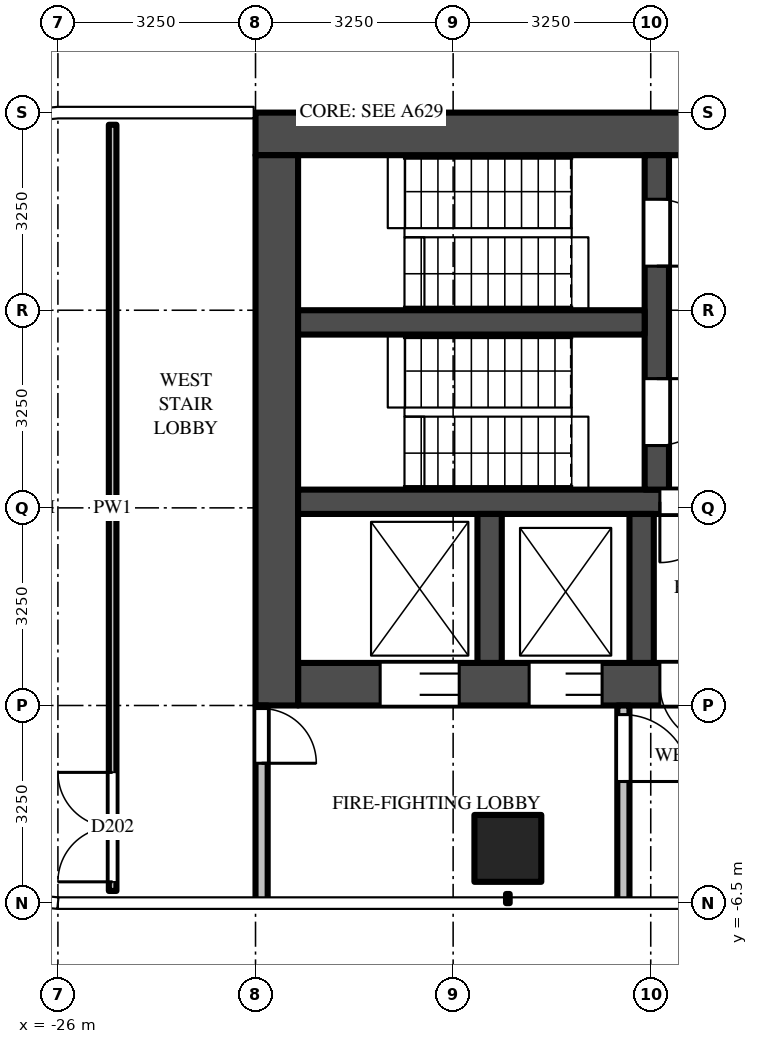
"""IFC4 building model, lengths in metres.
Left out: names, types, materials, properties, quantities, classifications, styles, units other than length and angle.
Written with IfcOpenShell. Run it as: python <this file> out.ifc"""

import sys

from ifc_helpers import new_model, si_unit, direction, frame, frame_2d, origin, origin_2d, place, context, subcontext, project, spatial, rectangle, extrude, source, transform, mapped, element, fill, save


model = new_model("IFC4")
c1 = context("Model", 3, precision=1e-05, world=origin(), true_north=direction((0.0, 1.0)))
c2 = subcontext(c1, "Body", "Model", "MODEL_VIEW")
j1 = project(units=[si_unit("LENGTHUNIT", "METRE"), si_unit("PLANEANGLEUNIT", "RADIAN")], contexts=[c1])
p1 = place(None, origin())
s1 = spatial("IfcSite", under=j1, at=p1, CompositionType="ELEMENT")
p2 = place(p1, origin())
s2 = spatial("IfcBuilding", under=s1, at=p2, CompositionType="ELEMENT")
p3 = place(p2, frame((0.0, 0.0, 236.3)))
s3 = spatial("IfcBuildingStorey", under=s2, at=p3, CompositionType="ELEMENT", Elevation=236.3)
m1 = source(origin(), c2, "Body", "SweptSolid", [
    extrude(rectangle(XDim=1.1, YDim=1.1, at=origin_2d()), origin(), (0.0, 0.0, 1.0), 3.9),
])
p4 = place(p3, frame((-18.6, -5.6, 0.0), z_axis=(0.0, 0.0, 1.0), x_axis=(1.0, 0.0, 0.0)))
e1 = element("IfcColumn", 1, at=p4, inside=s3, PredefinedType="COLUMN", context=c2, shape_type="MappedRepresentation", body=[
    mapped(m1, transform((0.0, 0.0, 0.0))),
])
m2 = source(origin(), c2, "Body", "SweptSolid", [
    extrude(rectangle(XDim=16.6, YDim=0.7, at=frame_2d((8.3, 0.0))), origin(), (0.0, 0.0, 1.0), 3.7),
])
p5 = place(p3, frame((-6.15, 6.15, 0.0), z_axis=(0.0, 0.0, 1.0), x_axis=(-1.0, 0.0, 0.0)))
e2 = element("IfcWall", 2, at=p5, inside=s3, PredefinedType="SHEAR", context=c2, shape_type="MappedRepresentation", body=[
    mapped(m2, transform((0.0, 0.0, 0.0))),
])
m3 = source(origin(), c2, "Body", "SweptSolid", [
    extrude(rectangle(XDim=14.85, YDim=0.7, at=frame_2d((7.425, 0.0))), origin(), (0.0, 0.0, 1.0), 3.7),
])
p6 = place(p3, frame((-7.2, -2.9, 0.0), z_axis=(0.0, 0.0, 1.0), x_axis=(-1.0, 0.0, 0.0)))
e3 = element("IfcWall", 3, at=p6, inside=s3, PredefinedType="SHEAR", context=c2, shape_type="MappedRepresentation", body=[
    mapped(m3, transform((0.0, 0.0, 0.0))),
])
m4 = source(origin(), c2, "Body", "SweptSolid", [
    extrude(rectangle(XDim=1.1, YDim=2.1, at=frame_2d((0.55, 1.05))), frame((0.0, 0.36, 0.0), z_axis=(0.0, -1.0, 0.0), x_axis=(1.0, 0.0, 0.0)), (0.0, 0.0, 1.0), 0.72),
])
p7 = place(p6, frame((0.55, 0.0, 0.0)))
e4 = element("IfcOpeningElement", 4, at=p7, cuts=e3, PredefinedType="OPENING", context=c2, shape_type="MappedRepresentation", body=[
    mapped(m4, transform((0.0, 0.0, 0.0))),
])
p8 = place(p6, frame((3.15, 0.0, 0.0)))
e5 = element("IfcOpeningElement", 5, at=p8, cuts=e3, PredefinedType="OPENING", context=c2, shape_type="MappedRepresentation", body=[
    mapped(m4, transform((0.0, 0.0, 0.0))),
])
m5 = source(origin(), c2, "Body", "SweptSolid", [
    extrude(rectangle(XDim=1.2, YDim=2.1, at=frame_2d((0.6, 1.05))), frame((0.0, 0.36, 0.0), z_axis=(0.0, -1.0, 0.0), x_axis=(1.0, 0.0, 0.0)), (0.0, 0.0, 1.0), 0.72),
])
p9 = place(p6, frame((5.7, 0.0, 0.0)))
e6 = element("IfcOpeningElement", 6, at=p9, cuts=e3, PredefinedType="OPENING", context=c2, shape_type="MappedRepresentation", body=[
    mapped(m5, transform((0.0, 0.0, 0.0))),
])
m6 = source(origin(), c2, "Body", "SweptSolid", [
    extrude(rectangle(XDim=1.3, YDim=2.1, at=frame_2d((0.65, 1.05))), frame((0.0, 0.36, 0.0), z_axis=(0.0, -1.0, 0.0), x_axis=(1.0, 0.0, 0.0)), (0.0, 0.0, 1.0), 0.72),
])
p10 = place(p6, frame((12.2, 0.0, 0.0)))
e7 = element("IfcOpeningElement", 7, at=p10, cuts=e3, PredefinedType="OPENING", context=c2, shape_type="MappedRepresentation", body=[
    mapped(m6, transform((0.0, 0.0, 0.0))),
])
p11 = place(p6, frame((9.85, 0.0, 0.0)))
e8 = element("IfcOpeningElement", 8, at=p11, cuts=e3, PredefinedType="OPENING", context=c2, shape_type="MappedRepresentation", body=[
    mapped(m5, transform((0.0, 0.0, 0.0))),
])
m7 = source(origin(), c2, "Body", "SweptSolid", [
    extrude(rectangle(XDim=1.0, YDim=2.1, at=frame_2d((0.5, 1.05))), frame((0.0, 0.36, 0.0), z_axis=(0.0, -1.0, 0.0), x_axis=(1.0, 0.0, 0.0)), (0.0, 0.0, 1.0), 0.72),
])
p12 = place(p6, frame((7.9, 0.0, 0.0)))
e9 = element("IfcOpeningElement", 9, at=p12, cuts=e3, PredefinedType="OPENING", context=c2, shape_type="MappedRepresentation", body=[
    mapped(m7, transform((0.0, 0.0, 0.0))),
])
m8 = source(origin(), c2, "Body", "SweptSolid", [
    extrude(rectangle(XDim=9.05, YDim=0.7, at=frame_2d((4.525, 0.0))), origin(), (0.0, 0.0, 1.0), 3.7),
])
p13 = place(p3, frame((-22.4, 5.8, 0.0), z_axis=(0.0, 0.0, 1.0), x_axis=(0.0, -1.0, 0.0)))
e10 = element("IfcWall", 10, at=p13, inside=s3, PredefinedType="SHEAR", context=c2, shape_type="MappedRepresentation", body=[
    mapped(m8, transform((0.0, 0.0, 0.0))),
])
m9 = source(origin(), c2, "Body", "SweptSolid", [
    extrude(rectangle(XDim=14.85, YDim=0.4, at=frame_2d((7.425, 0.0))), origin(), (0.0, 0.0, 1.0), 3.7),
])
p14 = place(p3, frame((-7.2, 0.1, 0.0), z_axis=(0.0, 0.0, 1.0), x_axis=(-1.0, 0.0, 0.0)))
e11 = element("IfcWall", 11, at=p14, inside=s3, PredefinedType="SHEAR", context=c2, shape_type="MappedRepresentation", body=[
    mapped(m9, transform((0.0, 0.0, 0.0))),
])
m10 = source(origin(), c2, "Body", "SweptSolid", [
    extrude(rectangle(XDim=1.0, YDim=2.1, at=frame_2d((0.5, 1.05))), frame((0.0, 0.21, 0.0), z_axis=(0.0, -1.0, 0.0), x_axis=(1.0, 0.0, 0.0)), (0.0, 0.0, 1.0), 0.42),
])
p15 = place(p14, frame((7.9, 0.0, 0.0)))
e12 = element("IfcOpeningElement", 12, at=p15, cuts=e11, PredefinedType="OPENING", context=c2, shape_type="MappedRepresentation", body=[
    mapped(m10, transform((0.0, 0.0, 0.0))),
])
m11 = source(origin(), c2, "Body", "SweptSolid", [
    extrude(rectangle(XDim=5.5, YDim=0.4, at=frame_2d((2.75, 0.0))), origin(), (0.0, 0.0, 1.0), 3.7),
])
p16 = place(p3, frame((-16.15, 5.8, 0.0), z_axis=(0.0, 0.0, 1.0), x_axis=(0.0, -1.0, 0.0)))
e13 = element("IfcWall", 13, at=p16, inside=s3, PredefinedType="SHEAR", context=c2, shape_type="MappedRepresentation", body=[
    mapped(m11, transform((0.0, 0.0, 0.0))),
])
m12 = source(origin(), c2, "Body", "SweptSolid", [
    extrude(rectangle(XDim=1.1, YDim=2.1, at=frame_2d((0.55, 1.05))), frame((0.0, 0.21, 0.0), z_axis=(0.0, -1.0, 0.0), x_axis=(1.0, 0.0, 0.0)), (0.0, 0.0, 1.0), 0.42),
])
p17 = place(p16, frame((0.725, 0.0, 0.0)))
e14 = element("IfcOpeningElement", 14, at=p17, cuts=e13, PredefinedType="OPENING", context=c2, shape_type="MappedRepresentation", body=[
    mapped(m12, transform((0.0, 0.0, 0.0))),
])
p18 = place(p16, frame((3.675, 0.0, 0.0)))
e15 = element("IfcOpeningElement", 15, at=p18, cuts=e13, PredefinedType="OPENING", context=c2, shape_type="MappedRepresentation", body=[
    mapped(m12, transform((0.0, 0.0, 0.0))),
])
m13 = source(origin(), c2, "Body", "SweptSolid", [
    extrude(rectangle(XDim=5.7, YDim=0.4, at=frame_2d((2.85, 0.0))), origin(), (0.0, 0.0, 1.0), 3.7),
])
p19 = place(p3, frame((-16.35, 3.05, 0.0), z_axis=(0.0, 0.0, 1.0), x_axis=(-1.0, 0.0, 0.0)))
e16 = element("IfcWall", 16, at=p19, inside=s3, PredefinedType="SHEAR", context=c2, shape_type="MappedRepresentation", body=[
    mapped(m13, transform((0.0, 0.0, 0.0))),
])
m14 = source(origin(), c2, "Body", "SweptSolid", [
    extrude(rectangle(XDim=2.45, YDim=0.4, at=frame_2d((1.225, 0.0))), origin(), (0.0, 0.0, 1.0), 3.7),
])
for number, where, z_axis, x_axis in (
    (17, (-16.4, -0.1, 0.0), (0.0, 0.0, 1.0), (0.0, -1.0, 0.0)),
    (18, (-18.9, -0.1, 0.0), (0.0, 0.0, 1.0), (0.0, -1.0, 0.0)),
):
    element("IfcWall", number, at=place(p3, frame(where, z_axis=z_axis, x_axis=x_axis)), inside=s3, PredefinedType="SHEAR", context=c2, shape_type="MappedRepresentation", body=[
        mapped(m14, transform((0.0, 0.0, 0.0))),
    ])
m15 = source(origin(), c2, "Body", "SweptSolid", [
    extrude(rectangle(XDim=3.25, YDim=0.2, at=frame_2d((1.625, 0.0))), origin(), (0.0, 0.0, 1.0), 3.7),
])
p20 = place(p3, frame((-16.7, -3.25, 0.0), z_axis=(0.0, 0.0, 1.0), x_axis=(0.0, -1.0, 0.0)))
e19 = element("IfcWall", 19, at=p20, inside=s3, PredefinedType="PARTITIONING", context=c2, shape_type="MappedRepresentation", body=[
    mapped(m15, transform((0.0, 0.0, 0.0))),
])
m16 = source(origin(), c2, "Body", "SweptSolid", [
    extrude(rectangle(XDim=1.1, YDim=2.1, at=frame_2d((0.55, 1.05))), frame((0.0, 0.11, 0.0), z_axis=(0.0, -1.0, 0.0), x_axis=(1.0, 0.0, 0.0)), (0.0, 0.0, 1.0), 0.22),
])
p21 = place(p20, frame((0.15, 0.0, 0.0)))
e20 = element("IfcOpeningElement", 20, at=p21, cuts=e19, PredefinedType="OPENING", context=c2, shape_type="MappedRepresentation", body=[
    mapped(m16, transform((0.0, 0.0, 0.0))),
])
p22 = place(p3, frame((-22.65, -3.25, 0.0), z_axis=(0.0, 0.0, 1.0), x_axis=(0.0, -1.0, 0.0)))
e21 = element("IfcWall", 21, at=p22, inside=s3, PredefinedType="PARTITIONING", context=c2, shape_type="MappedRepresentation", body=[
    mapped(m15, transform((0.0, 0.0, 0.0))),
])
m17 = source(origin(), c2, "Body", "SweptSolid", [
    extrude(rectangle(XDim=0.9, YDim=2.1, at=frame_2d((0.45, 1.05))), frame((0.0, 0.11, 0.0), z_axis=(0.0, -1.0, 0.0), x_axis=(1.0, 0.0, 0.0)), (0.0, 0.0, 1.0), 0.22),
])
p23 = place(p22, frame((0.05, 0.0, 0.0)))
e22 = element("IfcOpeningElement", 22, at=p23, cuts=e21, PredefinedType="OPENING", context=c2, shape_type="MappedRepresentation", body=[
    mapped(m17, transform((0.0, 0.0, 0.0))),
])
m18 = source(origin(), c2, "Body", "SweptSolid", [
    extrude(rectangle(XDim=12.6, YDim=0.125, at=frame_2d((6.3, 0.0))), origin(), (0.0, 0.0, 1.0), 2.78),
])
p24 = place(p3, frame((-25.1, -6.3, 0.0), z_axis=(0.0, 0.0, 1.0), x_axis=(0.0, 1.0, 0.0)))
e23 = element("IfcWall", 23, at=p24, inside=s3, PredefinedType="PARTITIONING", context=c2, shape_type="MappedRepresentation", body=[
    mapped(m18, transform((0.0, 0.0, 0.0))),
])
m19 = source(origin(), c2, "Body", "SweptSolid", [
    extrude(rectangle(XDim=1.8, YDim=2.1, at=frame_2d((0.9, 1.05))), frame((0.0, 0.073, 0.0), z_axis=(0.0, -1.0, 0.0), x_axis=(1.0, 0.0, 0.0)), (0.0, 0.0, 1.0), 0.145),
])
p25 = place(p24, frame((0.15, 0.0, 0.0)))
e24 = element("IfcOpeningElement", 24, at=p25, cuts=e23, PredefinedType="OPENING", context=c2, shape_type="MappedRepresentation", body=[
    mapped(m19, transform((0.0, 0.0, 0.0))),
])
m20 = source(origin(), c2, "Body", "SweptSolid", [
    extrude(rectangle(XDim=1.3, YDim=2.1, at=frame_2d((0.65, 1.05))), frame((0.0, -0.275, 0.0), z_axis=(0.0, -1.0, 0.0), x_axis=(1.0, 0.0, 0.0)), (0.0, 0.0, 1.0), 0.05),
])
p26 = place(p10, origin())
e25 = element("IfcDoor", 25, at=p26, inside=s3, OperationType="DOUBLE_DOOR_SLIDING", PredefinedType="DOOR", context=c2, shape_type="MappedRepresentation", body=[
    mapped(m20, transform((0.0, 0.0, 0.0))),
])
fill(e7, e25)
m21 = source(origin(), c2, "Body", "SweptSolid", [
    extrude(rectangle(XDim=1.2, YDim=2.1, at=frame_2d((0.6, 1.05))), frame((0.0, -0.275, 0.0), z_axis=(0.0, -1.0, 0.0), x_axis=(1.0, 0.0, 0.0)), (0.0, 0.0, 1.0), 0.05),
])
p27 = place(p11, origin())
e26 = element("IfcDoor", 26, at=p27, inside=s3, OperationType="DOUBLE_DOOR_SLIDING", PredefinedType="DOOR", context=c2, shape_type="MappedRepresentation", body=[
    mapped(m21, transform((0.0, 0.0, 0.0))),
])
fill(e8, e26)
m22 = source(origin(), c2, "Body", "SweptSolid", [
    extrude(rectangle(XDim=1.1, YDim=2.1, at=frame_2d((0.55, 1.05))), frame((0.0, 0.025, 0.0), z_axis=(0.0, -1.0, 0.0), x_axis=(1.0, 0.0, 0.0)), (0.0, 0.0, 1.0), 0.05),
])
p28 = place(p17, origin())
e27 = element("IfcDoor", 27, at=p28, inside=s3, OperationType="SINGLE_SWING_RIGHT", PredefinedType="DOOR", context=c2, shape_type="MappedRepresentation", body=[
    mapped(m22, transform((0.0, 0.0, 0.0))),
])
fill(e14, e27)
p29 = place(p18, origin())
e28 = element("IfcDoor", 28, at=p29, inside=s3, OperationType="SINGLE_SWING_LEFT", PredefinedType="DOOR", context=c2, shape_type="MappedRepresentation", body=[
    mapped(m22, transform((0.0, 0.0, 0.0))),
])
fill(e15, e28)
m23 = source(origin(), c2, "Body", "SweptSolid", [
    extrude(rectangle(XDim=1.0, YDim=2.1, at=frame_2d((0.5, 1.05))), frame((0.0, 0.025, 0.0), z_axis=(0.0, -1.0, 0.0), x_axis=(1.0, 0.0, 0.0)), (0.0, 0.0, 1.0), 0.05),
])
p30 = place(p15, origin())
e29 = element("IfcDoor", 29, at=p30, inside=s3, OperationType="SINGLE_SWING_RIGHT", PredefinedType="DOOR", context=c2, shape_type="MappedRepresentation", body=[
    mapped(m23, transform((0.0, 0.0, 0.0))),
])
fill(e12, e29)
m24 = source(origin(), c2, "Body", "SweptSolid", [
    extrude(rectangle(XDim=1.0, YDim=2.1, at=frame_2d((0.5, 1.05))), frame((0.0, -0.275, 0.0), z_axis=(0.0, -1.0, 0.0), x_axis=(1.0, 0.0, 0.0)), (0.0, 0.0, 1.0), 0.05),
])
p31 = place(p12, origin())
e30 = element("IfcDoor", 30, at=p31, inside=s3, OperationType="SINGLE_SWING_LEFT", PredefinedType="DOOR", context=c2, shape_type="MappedRepresentation", body=[
    mapped(m24, transform((0.0, 0.0, 0.0))),
])
fill(e9, e30)
p32 = place(p21, origin())
e31 = element("IfcDoor", 31, at=p32, inside=s3, OperationType="SINGLE_SWING_RIGHT", PredefinedType="DOOR", context=c2, shape_type="MappedRepresentation", body=[
    mapped(m22, transform((0.0, 0.0, 0.0))),
])
fill(e20, e31)
m25 = source(origin(), c2, "Body", "SweptSolid", [
    extrude(rectangle(XDim=0.9, YDim=2.1, at=frame_2d((0.45, 1.05))), frame((0.0, 0.025, 0.0), z_axis=(0.0, -1.0, 0.0), x_axis=(1.0, 0.0, 0.0)), (0.0, 0.0, 1.0), 0.05),
])
p33 = place(p23, origin())
e32 = element("IfcDoor", 32, at=p33, inside=s3, OperationType="SINGLE_SWING_RIGHT", PredefinedType="DOOR", context=c2, shape_type="MappedRepresentation", body=[
    mapped(m25, transform((0.0, 0.0, 0.0))),
])
fill(e22, e32)
m26 = source(origin(), c2, "Body", "SweptSolid", [
    extrude(rectangle(XDim=1.8, YDim=2.1, at=frame_2d((0.9, 1.05))), frame((0.0, 0.025, 0.0), z_axis=(0.0, -1.0, 0.0), x_axis=(1.0, 0.0, 0.0)), (0.0, 0.0, 1.0), 0.05),
])
p34 = place(p25, origin())
e33 = element("IfcDoor", 33, at=p34, inside=s3, OperationType="DOUBLE_DOOR_SINGLE_SWING", PredefinedType="DOOR", context=c2, shape_type="MappedRepresentation", body=[
    mapped(m26, transform((0.0, 0.0, 0.0))),
])
fill(e24, e33)
save(model, sys.argv[1])
